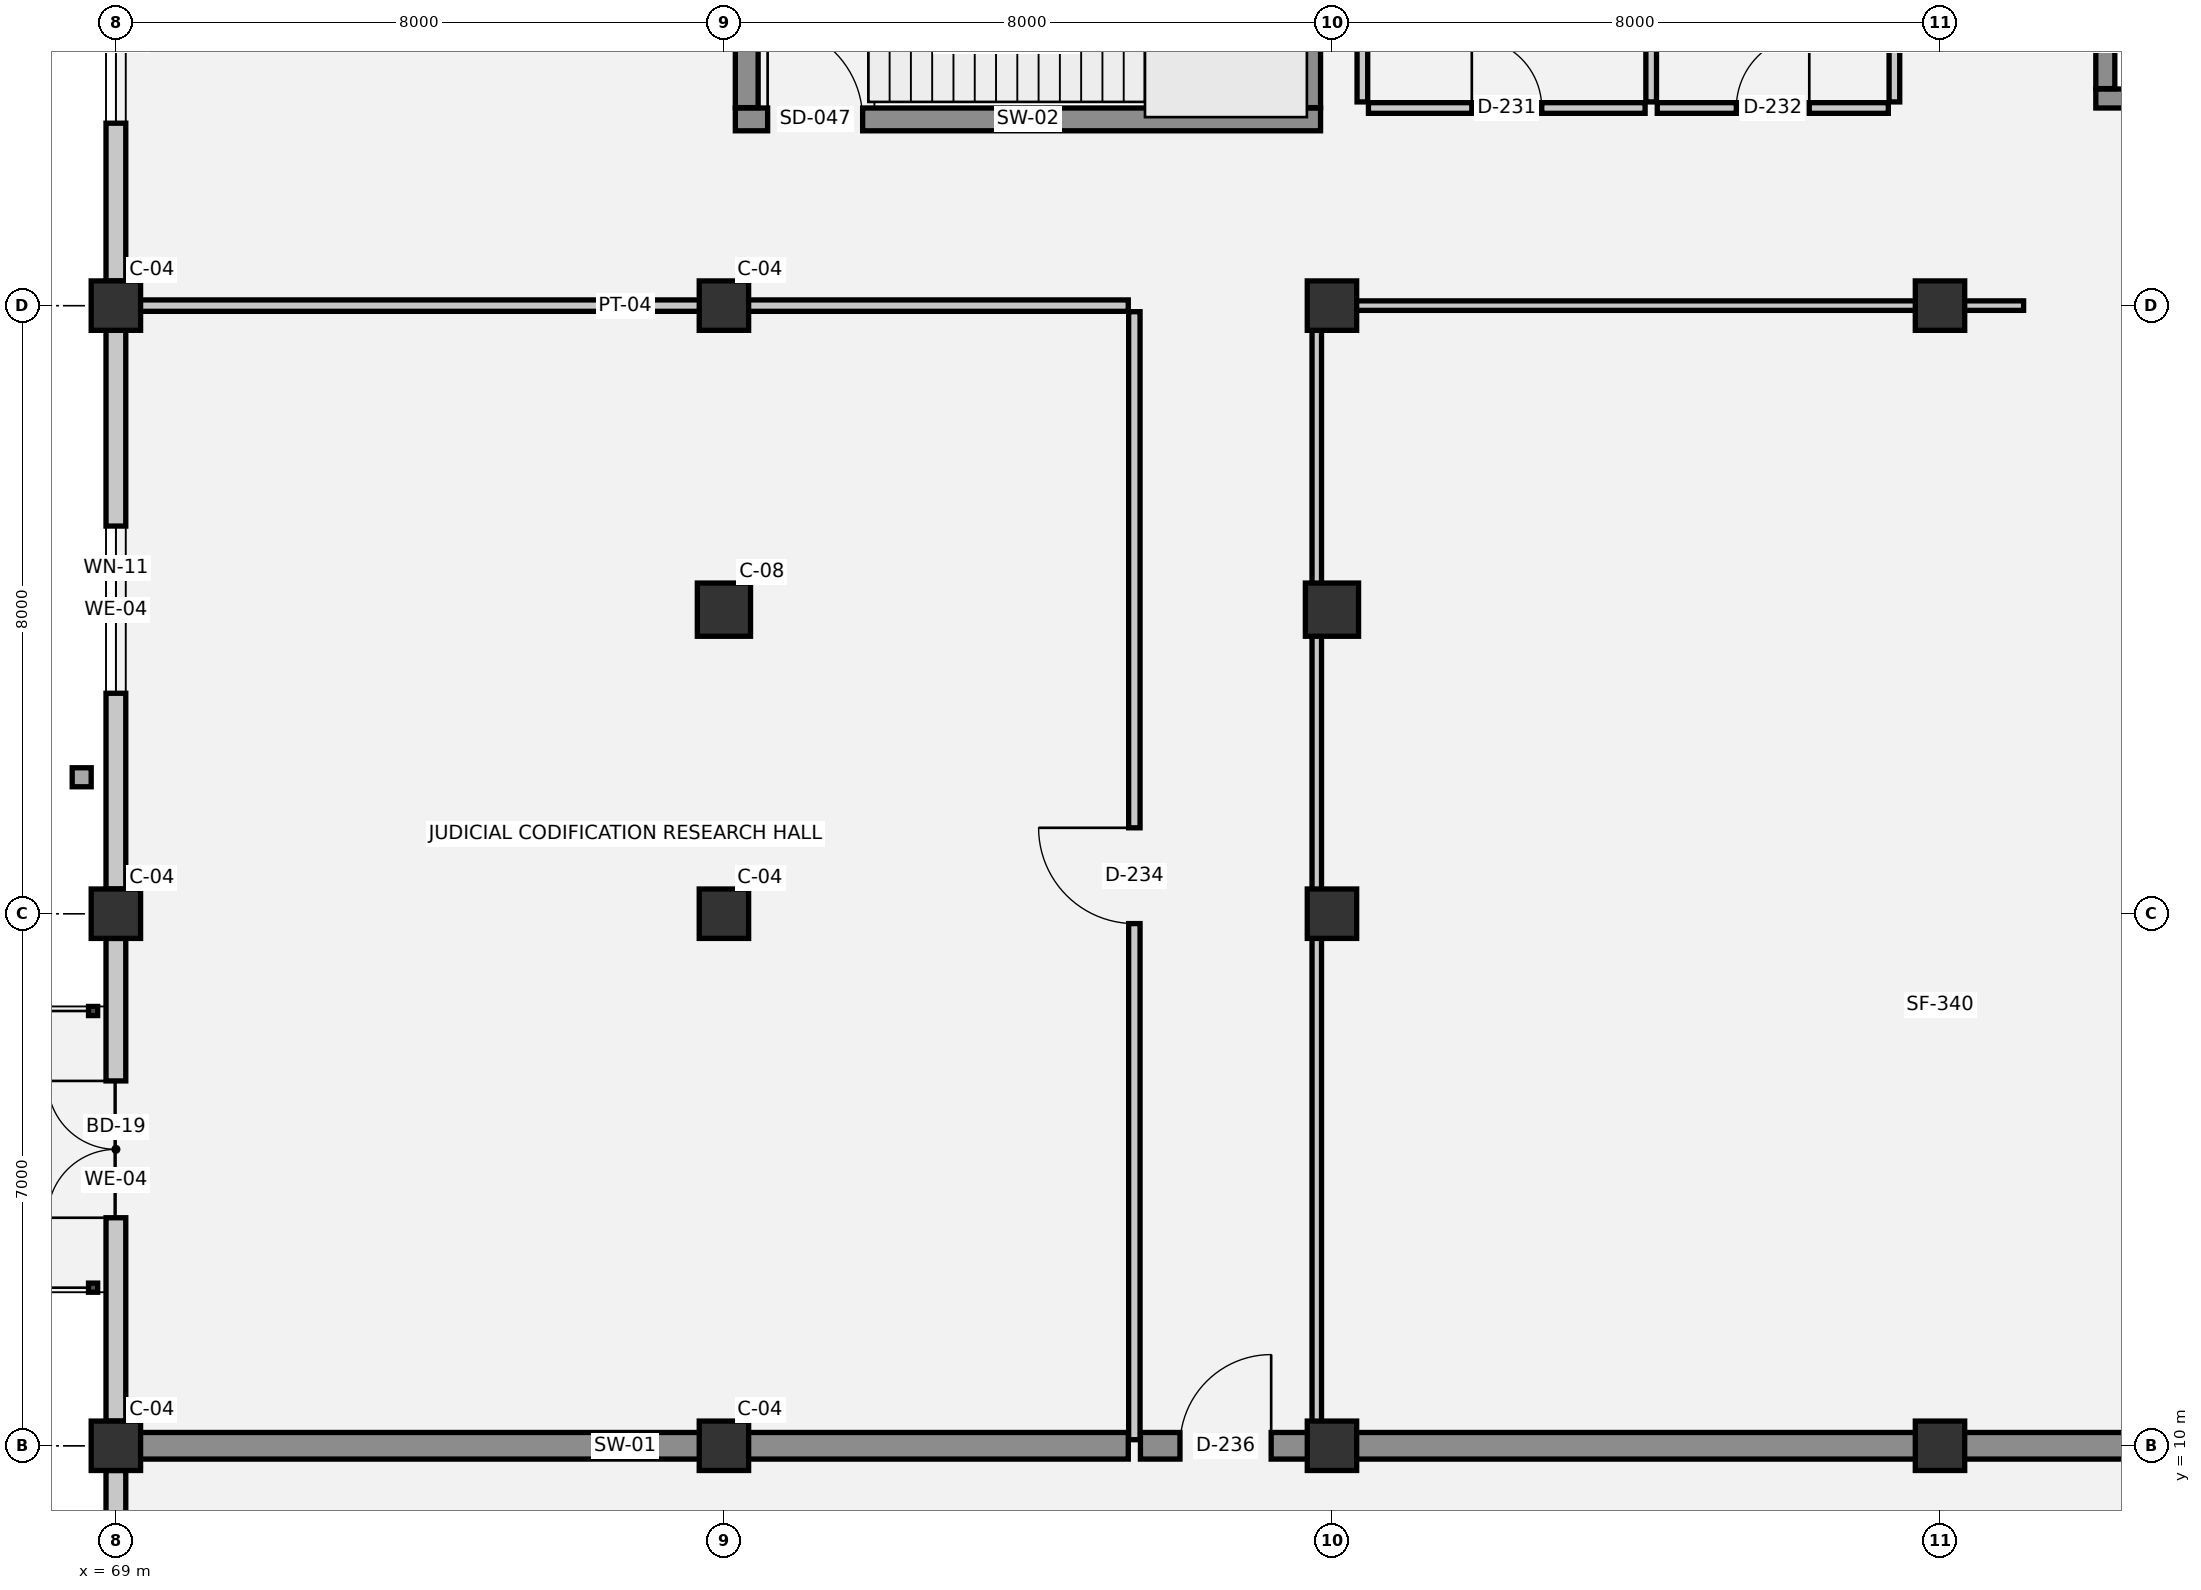
"""IFC4 building model, lengths in metres.
Left out: names, types, materials, properties, quantities, classifications, styles, units other than length and angle.
Written with IfcOpenShell. Run it as: python <this file> out.ifc"""

import sys

from ifc_helpers import new_model, si_unit, direction, frame, frame_2d, origin, origin_2d, place, context, subcontext, project, spatial, rectangle, circle, extrude, element, fill, save


model = new_model("IFC4")
c1 = context("Model", 3, precision=1e-05, world=origin(), true_north=direction((0.0, 1.0)))
c2 = subcontext(c1, "Body", "Model", "MODEL_VIEW")
j1 = project(units=[si_unit("LENGTHUNIT", "METRE"), si_unit("PLANEANGLEUNIT", "RADIAN")], contexts=[c1])
p1 = place(None, origin())
s1 = spatial("IfcSite", under=j1, at=p1, CompositionType="ELEMENT")
p2 = place(p1, origin())
s2 = spatial("IfcBuilding", under=s1, at=p2, CompositionType="ELEMENT")
p3 = place(p2, frame((0.0, 0.0, 5.4)))
s3 = spatial("IfcBuildingStorey", under=s2, at=p3, CompositionType="ELEMENT", Elevation=5.4)
for number, where, z_axis, x_axis in (
    (1, (69.0, 10.0, 0.0), (0.0, 0.0, 1.0), (1.0, 0.0, 0.0)),
    (2, (69.0, 17.0, 0.0), (0.0, 0.0, 1.0), (1.0, 0.0, 0.0)),
    (3, (69.0, 25.0, 0.0), (0.0, 0.0, 1.0), (1.0, 0.0, 0.0)),
    (4, (77.0, 10.0, 0.0), (0.0, 0.0, 1.0), (1.0, 0.0, 0.0)),
    (5, (77.0, 17.0, 0.0), (0.0, 0.0, 1.0), (1.0, 0.0, 0.0)),
    (6, (77.0, 25.0, 0.0), (0.0, 0.0, 1.0), (1.0, 0.0, 0.0)),
    (7, (85.0, 10.0, 0.0), (0.0, 0.0, 1.0), (1.0, 0.0, 0.0)),
    (8, (85.0, 17.0, 0.0), (0.0, 0.0, 1.0), (1.0, 0.0, 0.0)),
    (9, (85.0, 25.0, 0.0), (0.0, 0.0, 1.0), (1.0, 0.0, 0.0)),
    (10, (93.0, 10.0, 0.0), (0.0, 0.0, 1.0), (1.0, 0.0, 0.0)),
    (11, (93.0, 25.0, 0.0), (0.0, 0.0, 1.0), (1.0, 0.0, 0.0)),
):
    element("IfcColumn", number, at=place(p3, frame(where, z_axis=z_axis, x_axis=x_axis)), inside=s3, PredefinedType="COLUMN", context=c2, shape_type="SweptSolid", body=[
        extrude(rectangle(XDim=0.65, YDim=0.65, at=origin_2d()), origin(), (0.0, 0.0, 1.0), 4.5),
    ])
for number, where, z_axis, x_axis in (
    (12, (77.0, 21.0, 0.0), (0.0, 0.0, 1.0), (1.0, 0.0, 0.0)),
    (13, (85.0, 21.0, 0.0), (0.0, 0.0, 1.0), (1.0, 0.0, 0.0)),
):
    element("IfcColumn", number, at=place(p3, frame(where, z_axis=z_axis, x_axis=x_axis)), inside=s3, PredefinedType="COLUMN", context=c2, shape_type="SweptSolid", body=[
        extrude(circle(Radius=0.35, at=origin_2d()), origin(), (0.0, 0.0, 1.0), 4.5),
    ])
p4 = place(p3, frame((69.0, 4.325, 0.0), z_axis=(0.0, 0.0, 1.0), x_axis=(0.0, 1.0, 0.0)))
e14 = element("IfcWall", 14, at=p4, inside=s3, PredefinedType="SOLIDWALL", context=c2, shape_type="SweptSolid", body=[
    extrude(rectangle(XDim=5.35, YDim=0.26, at=frame_2d((2.675, 0.0))), origin(), (0.0, 0.0, 1.0), 3.44),
])
p5 = place(p4, frame((1.7, 0.0, 0.9)))
e15 = element("IfcOpeningElement", 15, at=p5, cuts=e14, PredefinedType="OPENING", context=c2, shape_type="SweptSolid", body=[
    extrude(rectangle(XDim=1.95, YDim=1.85, at=frame_2d((0.975, 0.925))), frame((0.0, 0.14, 0.0), z_axis=(0.0, -1.0, 0.0), x_axis=(1.0, 0.0, 0.0)), (0.0, 0.0, 1.0), 0.28),
])
p6 = place(p3, frame((69.0, 10.325, 0.0), z_axis=(0.0, 0.0, 1.0), x_axis=(0.0, 1.0, 0.0)))
e16 = element("IfcWall", 16, at=p6, inside=s3, PredefinedType="SOLIDWALL", context=c2, shape_type="SweptSolid", body=[
    extrude(rectangle(XDim=6.35, YDim=0.26, at=frame_2d((3.175, 0.0))), origin(), (0.0, 0.0, 1.0), 3.44),
])
p7 = place(p6, frame((2.675, 0.0, 0.0)))
e17 = element("IfcOpeningElement", 17, at=p7, cuts=e16, PredefinedType="OPENING", context=c2, shape_type="SweptSolid", body=[
    extrude(rectangle(XDim=1.8, YDim=2.25, at=frame_2d((0.9, 1.125))), frame((0.0, 0.14, 0.0), z_axis=(0.0, -1.0, 0.0), x_axis=(1.0, 0.0, 0.0)), (0.0, 0.0, 1.0), 0.28),
])
p8 = place(p3, frame((69.0, 17.325, 0.0), z_axis=(0.0, 0.0, 1.0), x_axis=(0.0, 1.0, 0.0)))
e18 = element("IfcWall", 18, at=p8, inside=s3, PredefinedType="SOLIDWALL", context=c2, shape_type="SweptSolid", body=[
    extrude(rectangle(XDim=7.35, YDim=0.26, at=frame_2d((3.675, 0.0))), origin(), (0.0, 0.0, 1.0), 3.44),
])
p9 = place(p8, frame((2.575, 0.0, 0.9)))
e19 = element("IfcOpeningElement", 19, at=p9, cuts=e18, PredefinedType="OPENING", context=c2, shape_type="SweptSolid", body=[
    extrude(rectangle(XDim=2.2, YDim=1.9, at=frame_2d((1.1, 0.95))), frame((0.0, 0.14, 0.0), z_axis=(0.0, -1.0, 0.0), x_axis=(1.0, 0.0, 0.0)), (0.0, 0.0, 1.0), 0.28),
])
p10 = place(p3, frame((69.0, 25.325, 0.0), z_axis=(0.0, 0.0, 1.0), x_axis=(0.0, 1.0, 0.0)))
e20 = element("IfcWall", 20, at=p10, inside=s3, PredefinedType="SOLIDWALL", context=c2, shape_type="SweptSolid", body=[
    extrude(rectangle(XDim=6.35, YDim=0.26, at=frame_2d((3.175, 0.0))), origin(), (0.0, 0.0, 1.0), 3.44),
])
p11 = place(p10, frame((2.075, 0.0, 0.9)))
e21 = element("IfcOpeningElement", 21, at=p11, cuts=e20, PredefinedType="OPENING", context=c2, shape_type="SweptSolid", body=[
    extrude(rectangle(XDim=2.2, YDim=1.9, at=frame_2d((1.1, 0.95))), frame((0.0, 0.14, 0.0), z_axis=(0.0, -1.0, 0.0), x_axis=(1.0, 0.0, 0.0)), (0.0, 0.0, 1.0), 0.28),
])
p12 = place(p3, frame((95.05, 27.725, 0.0), z_axis=(0.0, 0.0, 1.0), x_axis=(1.0, 0.0, 0.0)))
e22 = element("IfcWall", 22, at=p12, inside=s3, PredefinedType="SHEAR", context=c2, shape_type="SweptSolid", body=[
    extrude(rectangle(XDim=2.9, YDim=0.25, at=frame_2d((1.45, 0.0))), origin(), (0.0, 0.0, 1.0), 4.5),
])
p13 = place(p12, frame((0.9, 0.0, 0.0)))
e23 = element("IfcOpeningElement", 23, at=p13, cuts=e22, PredefinedType="OPENING", context=c2, shape_type="SweptSolid", body=[
    extrude(rectangle(XDim=1.1, YDim=2.15, at=frame_2d((0.55, 1.075))), frame((0.0, 0.135, 0.0), z_axis=(0.0, -1.0, 0.0), x_axis=(1.0, 0.0, 0.0)), (0.0, 0.0, 1.0), 0.27),
])
p14 = place(p3, frame((95.175, 30.545, 0.0), z_axis=(0.0, 0.0, 1.0), x_axis=(0.0, -1.0, 0.0)))
e24 = element("IfcWall", 24, at=p14, inside=s3, PredefinedType="SHEAR", context=c2, shape_type="SweptSolid", body=[
    extrude(rectangle(XDim=2.69, YDim=0.25, at=frame_2d((1.345, 0.0))), origin(), (0.0, 0.0, 1.0), 4.5),
])
p15 = place(p3, frame((77.15, 27.45, 0.0), z_axis=(0.0, 0.0, 1.0), x_axis=(1.0, 0.0, 0.0)))
e25 = element("IfcWall", 25, at=p15, inside=s3, PredefinedType="SHEAR", context=c2, shape_type="SweptSolid", body=[
    extrude(rectangle(XDim=7.7, YDim=0.3, at=frame_2d((3.85, 0.0))), origin(), (0.0, 0.0, 1.0), 4.16),
])
p16 = place(p15, frame((0.425, 0.0, 0.0)))
e26 = element("IfcOpeningElement", 26, at=p16, cuts=e25, PredefinedType="OPENING", context=c2, shape_type="SweptSolid", body=[
    extrude(rectangle(XDim=1.25, YDim=2.15, at=frame_2d((0.625, 1.075))), frame((0.0, 0.16, 0.0), z_axis=(0.0, -1.0, 0.0), x_axis=(1.0, 0.0, 0.0)), (0.0, 0.0, 1.0), 0.32),
])
for number, where, z_axis, x_axis in (
    (27, (77.3, 31.805, 0.0), (0.0, 0.0, 1.0), (0.0, -1.0, 0.0)),
    (28, (84.7, 27.605, 0.0), (0.0, 0.0, 1.0), (0.0, 1.0, 0.0)),
):
    element("IfcWall", number, at=place(p3, frame(where, z_axis=z_axis, x_axis=x_axis)), inside=s3, PredefinedType="SHEAR", context=c2, shape_type="SweptSolid", body=[
        extrude(rectangle(XDim=4.2, YDim=0.3, at=frame_2d((2.1, 0.0))), origin(), (0.0, 0.0, 1.0), 4.16),
    ])
p17 = place(p3, frame((69.08, 10.0, 0.0), z_axis=(0.0, 0.0, 1.0), x_axis=(1.0, 0.0, 0.0)))
e29 = element("IfcWall", 29, at=p17, inside=s3, PredefinedType="SHEAR", context=c2, shape_type="SweptSolid", body=[
    extrude(rectangle(XDim=13.24, YDim=0.35, at=frame_2d((6.62, 0.0))), origin(), (0.0, 0.0, 1.0), 4.14),
])
p18 = place(p3, frame((82.48, 10.0, 0.0), z_axis=(0.0, 0.0, 1.0), x_axis=(1.0, 0.0, 0.0)))
e30 = element("IfcWall", 30, at=p18, inside=s3, PredefinedType="SHEAR", context=c2, shape_type="SweptSolid", body=[
    extrude(rectangle(XDim=2.24, YDim=0.35, at=frame_2d((1.12, 0.0))), origin(), (0.0, 0.0, 1.0), 4.14),
])
p19 = place(p18, frame((0.52, 0.0, 0.0)))
e31 = element("IfcOpeningElement", 31, at=p19, cuts=e30, PredefinedType="OPENING", context=c2, shape_type="SweptSolid", body=[
    extrude(rectangle(XDim=1.2, YDim=2.15, at=frame_2d((0.6, 1.075))), frame((0.0, 0.185, 0.0), z_axis=(0.0, -1.0, 0.0), x_axis=(1.0, 0.0, 0.0)), (0.0, 0.0, 1.0), 0.37),
])
p20 = place(p3, frame((84.88, 10.0, 0.0), z_axis=(0.0, 0.0, 1.0), x_axis=(1.0, 0.0, 0.0)))
e32 = element("IfcWall", 32, at=p20, inside=s3, PredefinedType="SHEAR", context=c2, shape_type="SweptSolid", body=[
    extrude(rectangle(XDim=32.04, YDim=0.35, at=frame_2d((16.02, 0.0))), origin(), (0.0, 0.0, 1.0), 4.14),
])
p21 = place(p3, frame((69.08, 25.0, 0.0), z_axis=(0.0, 0.0, 1.0), x_axis=(1.0, 0.0, 0.0)))
e33 = element("IfcWall", 33, at=p21, inside=s3, PredefinedType="PARTITIONING", context=c2, shape_type="SweptSolid", body=[
    extrude(rectangle(XDim=13.24, YDim=0.15, at=frame_2d((6.62, 0.0))), origin(), (0.0, 0.0, 1.0), 3.46),
])
p22 = place(p3, frame((84.88, 25.0, 0.0), z_axis=(0.0, 0.0, 1.0), x_axis=(1.0, 0.0, 0.0)))
e34 = element("IfcWall", 34, at=p22, inside=s3, PredefinedType="PARTITIONING", context=c2, shape_type="SweptSolid", body=[
    extrude(rectangle(XDim=9.22, YDim=0.125, at=frame_2d((4.61, 0.0))), origin(), (0.0, 0.0, 1.0), 3.46),
])
p23 = place(p3, frame((85.48, 27.6, 0.0), z_axis=(0.0, 0.0, 1.0), x_axis=(1.0, 0.0, 0.0)))
e35 = element("IfcWall", 35, at=p23, inside=s3, PredefinedType="PLUMBINGWALL", context=c2, shape_type="SweptSolid", body=[
    extrude(rectangle(XDim=3.64, YDim=0.14, at=frame_2d((1.82, 0.0))), origin(), (0.0, 0.0, 1.0), 4.14),
])
p24 = place(p23, frame((1.36, 0.0, 0.0)))
e36 = element("IfcOpeningElement", 36, at=p24, cuts=e35, PredefinedType="OPENING", context=c2, shape_type="SweptSolid", body=[
    extrude(rectangle(XDim=0.92, YDim=2.1, at=frame_2d((0.46, 1.05))), frame((0.0, 0.08, 0.0), z_axis=(0.0, -1.0, 0.0), x_axis=(1.0, 0.0, 0.0)), (0.0, 0.0, 1.0), 0.16),
])
p25 = place(p3, frame((89.28, 27.6, 0.0), z_axis=(0.0, 0.0, 1.0), x_axis=(1.0, 0.0, 0.0)))
e37 = element("IfcWall", 37, at=p25, inside=s3, PredefinedType="PLUMBINGWALL", context=c2, shape_type="SweptSolid", body=[
    extrude(rectangle(XDim=3.04, YDim=0.14, at=frame_2d((1.52, 0.0))), origin(), (0.0, 0.0, 1.0), 4.14),
])
p26 = place(p25, frame((1.04, 0.0, 0.0)))
e38 = element("IfcOpeningElement", 38, at=p26, cuts=e37, PredefinedType="OPENING", context=c2, shape_type="SweptSolid", body=[
    extrude(rectangle(XDim=0.96, YDim=2.1, at=frame_2d((0.48, 1.05))), frame((0.0, 0.08, 0.0), z_axis=(0.0, -1.0, 0.0), x_axis=(1.0, 0.0, 0.0)), (0.0, 0.0, 1.0), 0.16),
])
p27 = place(p3, frame((82.4, 10.08, 0.0), z_axis=(0.0, 0.0, 1.0), x_axis=(0.0, 1.0, 0.0)))
e39 = element("IfcWall", 39, at=p27, inside=s3, PredefinedType="PARTITIONING", context=c2, shape_type="SweptSolid", body=[
    extrude(rectangle(XDim=14.84, YDim=0.15, at=frame_2d((7.42, 0.0))), origin(), (0.0, 0.0, 1.0), 4.14),
])
p28 = place(p27, frame((6.79, 0.0, 0.0)))
e40 = element("IfcOpeningElement", 40, at=p28, cuts=e39, PredefinedType="OPENING", context=c2, shape_type="SweptSolid", body=[
    extrude(rectangle(XDim=1.26, YDim=2.2, at=frame_2d((0.63, 1.1))), frame((0.0, 0.085, 0.0), z_axis=(0.0, -1.0, 0.0), x_axis=(1.0, 0.0, 0.0)), (0.0, 0.0, 1.0), 0.17),
])
p29 = place(p3, frame((84.8, 10.08, 0.0), z_axis=(0.0, 0.0, 1.0), x_axis=(0.0, 1.0, 0.0)))
e41 = element("IfcWall", 41, at=p29, inside=s3, PredefinedType="PARTITIONING", context=c2, shape_type="SweptSolid", body=[
    extrude(rectangle(XDim=14.84, YDim=0.125, at=frame_2d((7.42, 0.0))), origin(), (0.0, 0.0, 1.0), 3.61),
])
for number, where, z_axis, x_axis in (
    (42, (85.4, 27.68, 0.0), (0.0, 0.0, 1.0), (0.0, 1.0, 0.0)),
    (43, (89.2, 27.68, 0.0), (0.0, 0.0, 1.0), (0.0, 1.0, 0.0)),
    (44, (92.4, 27.68, 0.0), (0.0, 0.0, 1.0), (0.0, 1.0, 0.0)),
):
    element("IfcWall", number, at=place(p3, frame(where, z_axis=z_axis, x_axis=x_axis)), inside=s3, PredefinedType="PLUMBINGWALL", context=c2, shape_type="SweptSolid", body=[
        extrude(rectangle(XDim=4.24, YDim=0.14, at=frame_2d((2.12, 0.0))), origin(), (0.0, 0.0, 1.0), 4.14),
    ])
p30 = place(p7, origin())
e45 = element("IfcDoor", 45, at=p30, inside=s3, OperationType="DOUBLE_DOOR_SINGLE_SWING", PredefinedType="DOOR", context=c2, shape_type="SweptSolid", body=[
    extrude(rectangle(XDim=1.8, YDim=2.25, at=frame_2d((0.9, 1.125))), frame((0.0, 0.025, 0.0), z_axis=(0.0, -1.0, 0.0), x_axis=(1.0, 0.0, 0.0)), (0.0, 0.0, 1.0), 0.05),
])
fill(e17, e45)
p31 = place(p9, origin())
e46 = element("IfcWindow", 46, at=p31, inside=s3, PartitioningType="SINGLE_PANEL", PredefinedType="WINDOW", context=c2, shape_type="SweptSolid", body=[
    extrude(rectangle(XDim=2.2, YDim=1.9, at=frame_2d((1.1, 0.95))), frame((0.0, 0.03, 0.0), z_axis=(0.0, -1.0, 0.0), x_axis=(1.0, 0.0, 0.0)), (0.0, 0.0, 1.0), 0.06),
])
fill(e19, e46)
p32 = place(p11, origin())
e47 = element("IfcWindow", 47, at=p32, inside=s3, PartitioningType="SINGLE_PANEL", PredefinedType="WINDOW", context=c2, shape_type="SweptSolid", body=[
    extrude(rectangle(XDim=2.2, YDim=1.9, at=frame_2d((1.1, 0.95))), frame((0.0, 0.03, 0.0), z_axis=(0.0, -1.0, 0.0), x_axis=(1.0, 0.0, 0.0)), (0.0, 0.0, 1.0), 0.06),
])
fill(e21, e47)
p33 = place(p16, origin())
e48 = element("IfcDoor", 48, at=p33, inside=s3, OperationType="SINGLE_SWING_LEFT", PredefinedType="DOOR", context=c2, shape_type="SweptSolid", body=[
    extrude(rectangle(XDim=1.25, YDim=2.15, at=frame_2d((0.625, 1.075))), frame((0.0, 0.025, 0.0), z_axis=(0.0, -1.0, 0.0), x_axis=(1.0, 0.0, 0.0)), (0.0, 0.0, 1.0), 0.05),
])
fill(e26, e48)
p34 = place(p24, origin())
e49 = element("IfcDoor", 49, at=p34, inside=s3, OperationType="SINGLE_SWING_LEFT", PredefinedType="DOOR", context=c2, shape_type="SweptSolid", body=[
    extrude(rectangle(XDim=0.92, YDim=2.1, at=frame_2d((0.46, 1.05))), frame((0.0, 0.025, 0.0), z_axis=(0.0, -1.0, 0.0), x_axis=(1.0, 0.0, 0.0)), (0.0, 0.0, 1.0), 0.05),
])
fill(e36, e49)
p35 = place(p26, origin())
e50 = element("IfcDoor", 50, at=p35, inside=s3, OperationType="SINGLE_SWING_RIGHT", PredefinedType="DOOR", context=c2, shape_type="SweptSolid", body=[
    extrude(rectangle(XDim=0.96, YDim=2.1, at=frame_2d((0.48, 1.05))), frame((0.0, 0.025, 0.0), z_axis=(0.0, -1.0, 0.0), x_axis=(1.0, 0.0, 0.0)), (0.0, 0.0, 1.0), 0.05),
])
fill(e38, e50)
p36 = place(p28, origin())
e51 = element("IfcDoor", 51, at=p36, inside=s3, OperationType="SINGLE_SWING_RIGHT", PredefinedType="DOOR", context=c2, shape_type="SweptSolid", body=[
    extrude(rectangle(XDim=1.26, YDim=2.2, at=frame_2d((0.63, 1.1))), frame((0.0, 0.025, 0.0), z_axis=(0.0, -1.0, 0.0), x_axis=(1.0, 0.0, 0.0)), (0.0, 0.0, 1.0), 0.05),
])
fill(e40, e51)
p37 = place(p19, origin())
e52 = element("IfcDoor", 52, at=p37, inside=s3, OperationType="SINGLE_SWING_RIGHT", PredefinedType="DOOR", context=c2, shape_type="SweptSolid", body=[
    extrude(rectangle(XDim=1.2, YDim=2.15, at=frame_2d((0.6, 1.075))), frame((0.0, 0.025, 0.0), z_axis=(0.0, -1.0, 0.0), x_axis=(1.0, 0.0, 0.0)), (0.0, 0.0, 1.0), 0.05),
])
fill(e31, e52)
save(model, sys.argv[1])
